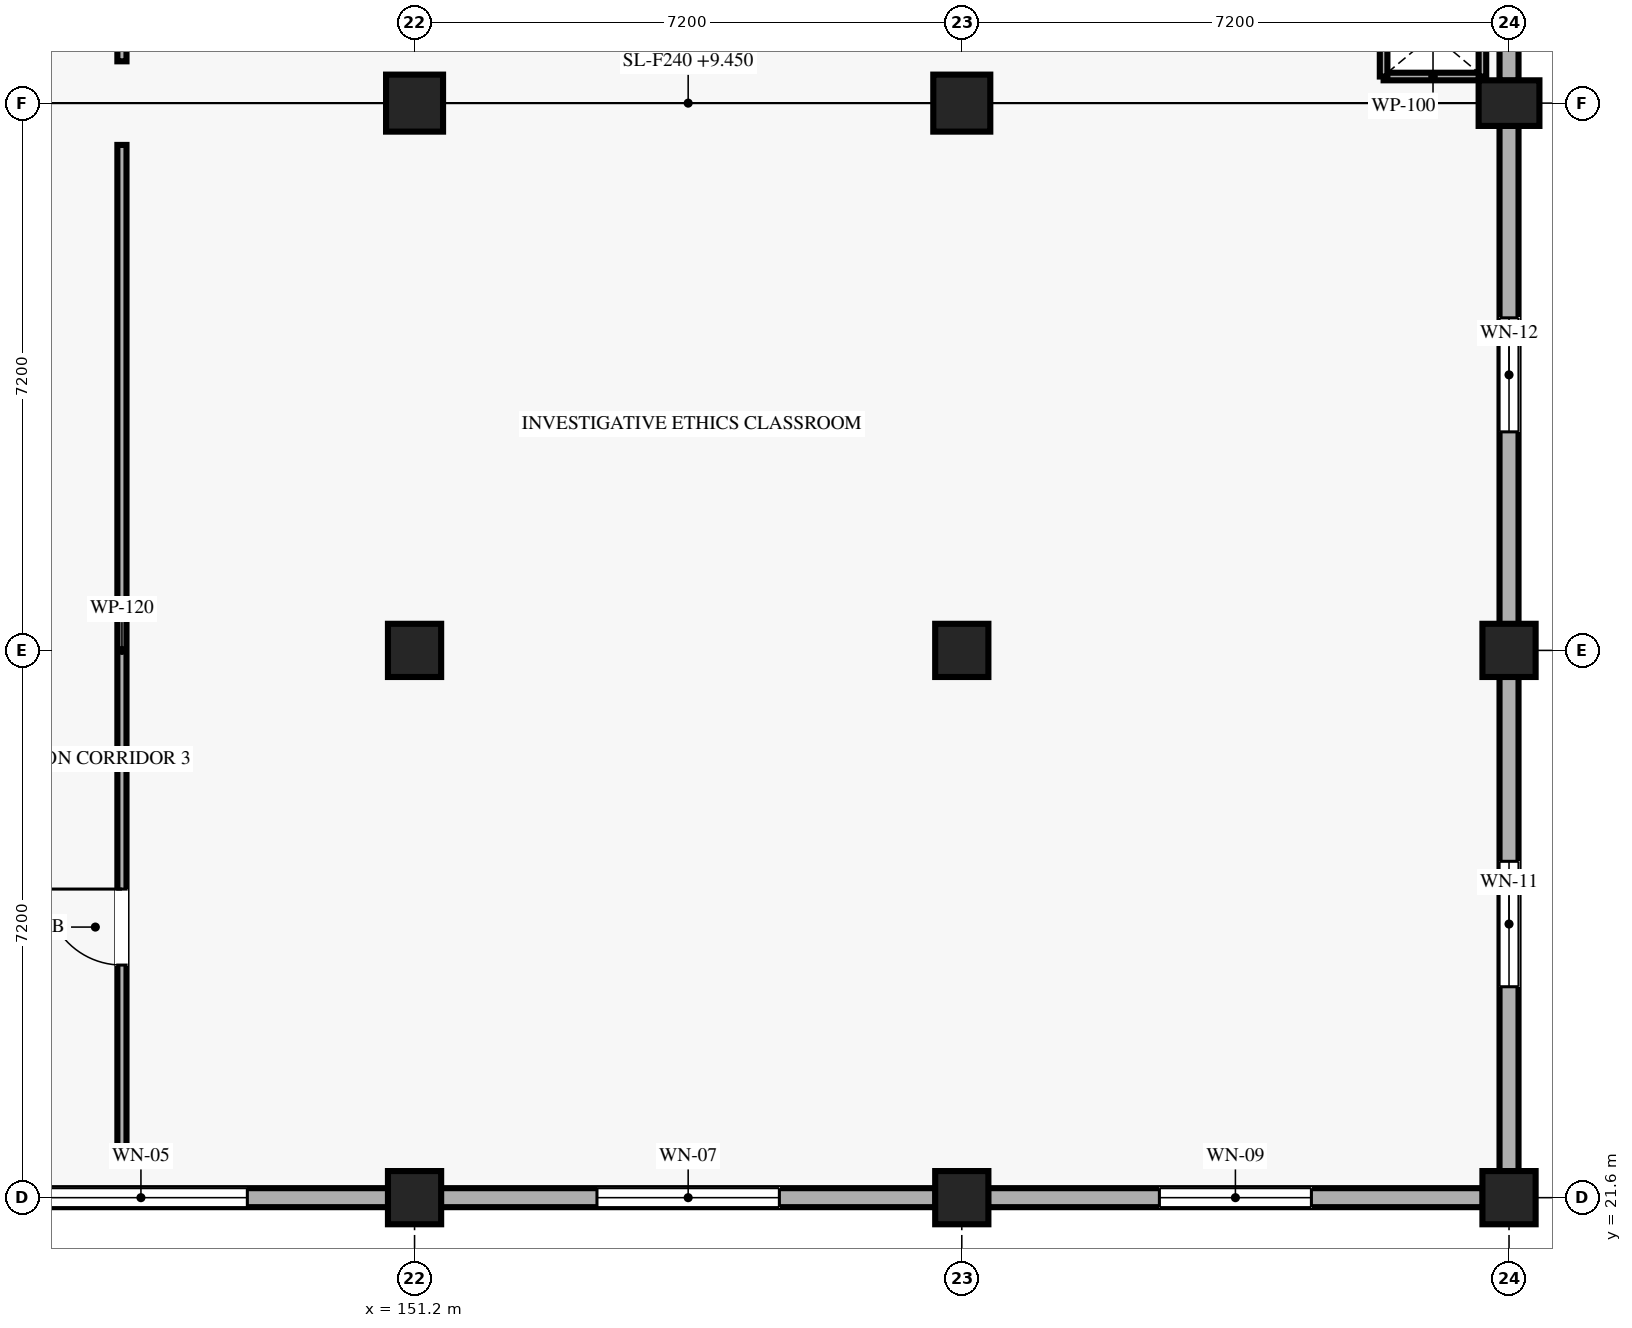
"""IFC4 building model, lengths in metres.
Left out: names, types, materials, properties, quantities, classifications, styles, units other than length and angle.
Written with IfcOpenShell. Run it as: python <this file> out.ifc"""

import sys

from ifc_helpers import new_model, si_unit, direction, frame, frame_2d, origin, origin_2d, place, context, subcontext, project, spatial, rectangle, extrude, element, fill, save


model = new_model("IFC4")
c1 = context("Model", 3, precision=1e-05, world=origin(), true_north=direction((0.0, 1.0)))
c2 = subcontext(c1, "Body", "Model", "MODEL_VIEW")
j1 = project(units=[si_unit("LENGTHUNIT", "METRE"), si_unit("PLANEANGLEUNIT", "RADIAN")], contexts=[c1])
p1 = place(None, origin())
s1 = spatial("IfcSite", under=j1, at=p1, CompositionType="ELEMENT")
p2 = place(p1, origin())
s2 = spatial("IfcBuilding", under=s1, at=p2, CompositionType="ELEMENT")
p3 = place(p2, frame((0.0, 0.0, 9.45)))
s3 = spatial("IfcBuildingStorey", under=s2, at=p3, CompositionType="ELEMENT", Elevation=9.45)
for number, where, z_axis, x_axis in (
    (1, (151.2, 21.6, 0.0), (0.0, 0.0, 1.0), (1.0, 0.0, 0.0)),
    (2, (151.2, 28.8, 0.0), (0.0, 0.0, 1.0), (1.0, 0.0, 0.0)),
):
    element("IfcColumn", number, at=place(p3, frame(where, z_axis=z_axis, x_axis=x_axis)), inside=s3, PredefinedType="COLUMN", context=c2, shape_type="SweptSolid", body=[
        extrude(rectangle(XDim=0.7, YDim=0.7, at=origin_2d()), origin(), (0.0, 0.0, 1.0), 4.05),
    ])
p4 = place(p3, frame((151.2, 36.0, 0.0), z_axis=(0.0, 0.0, 1.0), x_axis=(1.0, 0.0, 0.0)))
e3 = element("IfcColumn", 3, at=p4, inside=s3, PredefinedType="COLUMN", context=c2, shape_type="SweptSolid", body=[
    extrude(rectangle(XDim=0.75, YDim=0.75, at=origin_2d()), origin(), (0.0, 0.0, 1.0), 4.05),
])
for number, where, z_axis, x_axis in (
    (4, (158.4, 21.6, 0.0), (0.0, 0.0, 1.0), (1.0, 0.0, 0.0)),
    (5, (158.4, 28.8, 0.0), (0.0, 0.0, 1.0), (1.0, 0.0, 0.0)),
):
    element("IfcColumn", number, at=place(p3, frame(where, z_axis=z_axis, x_axis=x_axis)), inside=s3, PredefinedType="COLUMN", context=c2, shape_type="SweptSolid", body=[
        extrude(rectangle(XDim=0.7, YDim=0.7, at=origin_2d()), origin(), (0.0, 0.0, 1.0), 4.05),
    ])
p5 = place(p3, frame((158.4, 36.0, 0.0), z_axis=(0.0, 0.0, 1.0), x_axis=(1.0, 0.0, 0.0)))
e6 = element("IfcColumn", 6, at=p5, inside=s3, PredefinedType="COLUMN", context=c2, shape_type="SweptSolid", body=[
    extrude(rectangle(XDim=0.75, YDim=0.75, at=origin_2d()), origin(), (0.0, 0.0, 1.0), 4.05),
])
for number, where, z_axis, x_axis in (
    (7, (165.6, 21.6, 0.0), (0.0, 0.0, 1.0), (1.0, 0.0, 0.0)),
    (8, (165.6, 28.8, 0.0), (0.0, 0.0, 1.0), (1.0, 0.0, 0.0)),
):
    element("IfcColumn", number, at=place(p3, frame(where, z_axis=z_axis, x_axis=x_axis)), inside=s3, PredefinedType="COLUMN", context=c2, shape_type="SweptSolid", body=[
        extrude(rectangle(XDim=0.7, YDim=0.7, at=origin_2d()), origin(), (0.0, 0.0, 1.0), 4.05),
    ])
p6 = place(p3, frame((165.6, 36.0, 0.0), z_axis=(0.0, 0.0, 1.0), x_axis=(0.0, 1.0, 0.0)))
e9 = element("IfcColumn", 9, at=p6, inside=s3, PredefinedType="COLUMN", context=c2, shape_type="SweptSolid", body=[
    extrude(rectangle(XDim=0.6, YDim=0.8, at=origin_2d()), origin(), (0.0, 0.0, 1.0), 4.05),
])
p7 = place(p3, frame((144.345, 21.6, 0.0), z_axis=(0.0, 0.0, 1.0), x_axis=(1.0, 0.0, 0.0)))
e10 = element("IfcWall", 10, at=p7, inside=s3, PredefinedType="SOLIDWALL", context=c2, shape_type="SweptSolid", body=[
    extrude(rectangle(XDim=6.51, YDim=0.25, at=frame_2d((3.255, 0.0))), origin(), (0.0, 0.0, 1.0), 3.195),
])
p8 = place(p7, frame((1.855, 0.0, 0.85)))
e11 = element("IfcOpeningElement", 11, at=p8, cuts=e10, PredefinedType="OPENING", context=c2, shape_type="SweptSolid", body=[
    extrude(rectangle(XDim=2.8, YDim=1.85, at=frame_2d((1.4, 0.925))), frame((0.0, 0.135, 0.0), z_axis=(0.0, -1.0, 0.0), x_axis=(1.0, 0.0, 0.0)), (0.0, 0.0, 1.0), 0.27),
])
p9 = place(p3, frame((151.545, 21.6, 0.0), z_axis=(0.0, 0.0, 1.0), x_axis=(1.0, 0.0, 0.0)))
e12 = element("IfcWall", 12, at=p9, inside=s3, PredefinedType="SOLIDWALL", context=c2, shape_type="SweptSolid", body=[
    extrude(rectangle(XDim=6.51, YDim=0.25, at=frame_2d((3.255, 0.0))), origin(), (0.0, 0.0, 1.0), 3.195),
])
p10 = place(p9, frame((2.055, 0.0, 0.85)))
e13 = element("IfcOpeningElement", 13, at=p10, cuts=e12, PredefinedType="OPENING", context=c2, shape_type="SweptSolid", body=[
    extrude(rectangle(XDim=2.4, YDim=1.75, at=frame_2d((1.2, 0.875))), frame((0.0, 0.135, 0.0), z_axis=(0.0, -1.0, 0.0), x_axis=(1.0, 0.0, 0.0)), (0.0, 0.0, 1.0), 0.27),
])
p11 = place(p3, frame((158.745, 21.6, 0.0), z_axis=(0.0, 0.0, 1.0), x_axis=(1.0, 0.0, 0.0)))
e14 = element("IfcWall", 14, at=p11, inside=s3, PredefinedType="SOLIDWALL", context=c2, shape_type="SweptSolid", body=[
    extrude(rectangle(XDim=6.51, YDim=0.25, at=frame_2d((3.255, 0.0))), origin(), (0.0, 0.0, 1.0), 3.195),
])
p12 = place(p11, frame((2.255, 0.0, 0.85)))
e15 = element("IfcOpeningElement", 15, at=p12, cuts=e14, PredefinedType="OPENING", context=c2, shape_type="SweptSolid", body=[
    extrude(rectangle(XDim=2.0, YDim=1.65, at=frame_2d((1.0, 0.825))), frame((0.0, 0.135, 0.0), z_axis=(0.0, -1.0, 0.0), x_axis=(1.0, 0.0, 0.0)), (0.0, 0.0, 1.0), 0.27),
])
p13 = place(p3, frame((165.6, 21.945, 0.0), z_axis=(0.0, 0.0, 1.0), x_axis=(0.0, 1.0, 0.0)))
e16 = element("IfcWall", 16, at=p13, inside=s3, PredefinedType="SOLIDWALL", context=c2, shape_type="SweptSolid", body=[
    extrude(rectangle(XDim=6.51, YDim=0.25, at=frame_2d((3.255, 0.0))), origin(), (0.0, 0.0, 1.0), 3.195),
])
p14 = place(p13, frame((2.43, 0.0, 0.85)))
e17 = element("IfcOpeningElement", 17, at=p14, cuts=e16, PredefinedType="OPENING", context=c2, shape_type="SweptSolid", body=[
    extrude(rectangle(XDim=1.65, YDim=1.55, at=frame_2d((0.825, 0.775))), frame((0.0, 0.135, 0.0), z_axis=(0.0, -1.0, 0.0), x_axis=(1.0, 0.0, 0.0)), (0.0, 0.0, 1.0), 0.27),
])
p15 = place(p3, frame((165.6, 29.145, 0.0), z_axis=(0.0, 0.0, 1.0), x_axis=(0.0, 1.0, 0.0)))
e18 = element("IfcWall", 18, at=p15, inside=s3, PredefinedType="SOLIDWALL", context=c2, shape_type="SweptSolid", body=[
    extrude(rectangle(XDim=6.56, YDim=0.25, at=frame_2d((3.28, 0.0))), origin(), (0.0, 0.0, 1.0), 3.195),
])
p16 = place(p15, frame((2.53, 0.0, 0.85)))
e19 = element("IfcOpeningElement", 19, at=p16, cuts=e18, PredefinedType="OPENING", context=c2, shape_type="SweptSolid", body=[
    extrude(rectangle(XDim=1.5, YDim=2.05, at=frame_2d((0.75, 1.025))), frame((0.0, 0.135, 0.0), z_axis=(0.0, -1.0, 0.0), x_axis=(1.0, 0.0, 0.0)), (0.0, 0.0, 1.0), 0.27),
])
p17 = place(p3, frame((165.6, 36.295, 0.0), z_axis=(0.0, 0.0, 1.0), x_axis=(0.0, 1.0, 0.0)))
e20 = element("IfcWall", 20, at=p17, inside=s3, PredefinedType="SOLIDWALL", context=c2, shape_type="SweptSolid", body=[
    extrude(rectangle(XDim=3.11, YDim=0.25, at=frame_2d((1.555, 0.0))), origin(), (0.0, 0.0, 1.0), 3.195),
])
p18 = place(p17, frame((0.93, 0.0, 0.85)))
e21 = element("IfcOpeningElement", 21, at=p18, cuts=e20, PredefinedType="OPENING", context=c2, shape_type="SweptSolid", body=[
    extrude(rectangle(XDim=1.25, YDim=1.5, at=frame_2d((0.625, 0.75))), frame((0.0, 0.135, 0.0), z_axis=(0.0, -1.0, 0.0), x_axis=(1.0, 0.0, 0.0)), (0.0, 0.0, 1.0), 0.27),
])
p19 = place(p3, frame((163.95, 36.35, 0.0), z_axis=(0.0, 0.0, 1.0), x_axis=(1.0, 0.0, 0.0)))
e22 = element("IfcWall", 22, at=p19, inside=s3, PredefinedType="PARTITIONING", context=c2, shape_type="SweptSolid", body=[
    extrude(rectangle(XDim=1.3, YDim=0.1, at=frame_2d((0.65, 0.0))), origin(), (0.0, 0.0, 1.0), 3.2),
])
p20 = place(p3, frame((163.95, 36.35, 0.0), z_axis=(0.0, 0.0, 1.0), x_axis=(0.0, 1.0, 0.0)))
e23 = element("IfcWall", 23, at=p20, inside=s3, PredefinedType="PARTITIONING", context=c2, shape_type="SweptSolid", body=[
    extrude(rectangle(XDim=1.1, YDim=0.1, at=frame_2d((0.55, 0.0))), origin(), (0.0, 0.0, 1.0), 3.81),
])
p21 = place(p3, frame((165.25, 36.35, 0.0), z_axis=(0.0, 0.0, 1.0), x_axis=(0.0, 1.0, 0.0)))
e24 = element("IfcWall", 24, at=p21, inside=s3, PredefinedType="PARTITIONING", context=c2, shape_type="SweptSolid", body=[
    extrude(rectangle(XDim=1.1, YDim=0.1, at=frame_2d((0.55, 0.0))), origin(), (0.0, 0.0, 1.0), 3.2),
])
p22 = place(p3, frame((147.35, 36.55, 0.0), z_axis=(0.0, 0.0, 1.0), x_axis=(0.0, 1.0, 0.0)))
e25 = element("IfcWall", 25, at=p22, inside=s3, PredefinedType="PARTITIONING", context=c2, shape_type="SweptSolid", body=[
    extrude(rectangle(XDim=15.95, YDim=0.12, at=frame_2d((7.975, 0.0))), origin(), (0.0, 0.0, 1.0), 3.81),
])
p23 = place(p22, frame((2.25, 0.0, 0.0)))
e26 = element("IfcOpeningElement", 26, at=p23, cuts=e25, PredefinedType="OPENING", context=c2, shape_type="SweptSolid", body=[
    extrude(rectangle(XDim=1.7, YDim=2.2, at=frame_2d((0.85, 1.1))), frame((0.0, 0.07, 0.0), z_axis=(0.0, -1.0, 0.0), x_axis=(1.0, 0.0, 0.0)), (0.0, 0.0, 1.0), 0.14),
])
p24 = place(p3, frame((147.35, 22.15, 0.0), z_axis=(0.0, 0.0, 1.0), x_axis=(0.0, 1.0, 0.0)))
e27 = element("IfcWall", 27, at=p24, inside=s3, PredefinedType="PARTITIONING", context=c2, shape_type="SweptSolid", body=[
    extrude(rectangle(XDim=13.3, YDim=0.12, at=frame_2d((6.65, 0.0))), origin(), (0.0, 0.0, 1.0), 3.81),
])
p25 = place(p24, frame((2.51, 0.0, 0.0)))
e28 = element("IfcOpeningElement", 28, at=p25, cuts=e27, PredefinedType="OPENING", context=c2, shape_type="SweptSolid", body=[
    extrude(rectangle(XDim=1.0, YDim=2.1, at=frame_2d((0.5, 1.05))), frame((0.0, 0.07, 0.0), z_axis=(0.0, -1.0, 0.0), x_axis=(1.0, 0.0, 0.0)), (0.0, 0.0, 1.0), 0.14),
])
p26 = place(p8, origin())
e29 = element("IfcWindow", 29, at=p26, inside=s3, PartitioningType="SINGLE_PANEL", PredefinedType="WINDOW", context=c2, shape_type="SweptSolid", body=[
    extrude(rectangle(XDim=2.8, YDim=1.85, at=frame_2d((1.4, 0.925))), frame((0.0, 0.03, 0.0), z_axis=(0.0, -1.0, 0.0), x_axis=(1.0, 0.0, 0.0)), (0.0, 0.0, 1.0), 0.06),
])
fill(e11, e29)
p27 = place(p10, origin())
e30 = element("IfcWindow", 30, at=p27, inside=s3, PartitioningType="SINGLE_PANEL", PredefinedType="WINDOW", context=c2, shape_type="SweptSolid", body=[
    extrude(rectangle(XDim=2.4, YDim=1.75, at=frame_2d((1.2, 0.875))), frame((0.0, 0.03, 0.0), z_axis=(0.0, -1.0, 0.0), x_axis=(1.0, 0.0, 0.0)), (0.0, 0.0, 1.0), 0.06),
])
fill(e13, e30)
p28 = place(p12, origin())
e31 = element("IfcWindow", 31, at=p28, inside=s3, PartitioningType="SINGLE_PANEL", PredefinedType="WINDOW", context=c2, shape_type="SweptSolid", body=[
    extrude(rectangle(XDim=2.0, YDim=1.65, at=frame_2d((1.0, 0.825))), frame((0.0, 0.03, 0.0), z_axis=(0.0, -1.0, 0.0), x_axis=(1.0, 0.0, 0.0)), (0.0, 0.0, 1.0), 0.06),
])
fill(e15, e31)
p29 = place(p14, origin())
e32 = element("IfcWindow", 32, at=p29, inside=s3, PartitioningType="SINGLE_PANEL", PredefinedType="WINDOW", context=c2, shape_type="SweptSolid", body=[
    extrude(rectangle(XDim=1.65, YDim=1.55, at=frame_2d((0.825, 0.775))), frame((0.0, 0.03, 0.0), z_axis=(0.0, -1.0, 0.0), x_axis=(1.0, 0.0, 0.0)), (0.0, 0.0, 1.0), 0.06),
])
fill(e17, e32)
p30 = place(p16, origin())
e33 = element("IfcWindow", 33, at=p30, inside=s3, PartitioningType="SINGLE_PANEL", PredefinedType="WINDOW", context=c2, shape_type="SweptSolid", body=[
    extrude(rectangle(XDim=1.5, YDim=2.05, at=frame_2d((0.75, 1.025))), frame((0.0, 0.03, 0.0), z_axis=(0.0, -1.0, 0.0), x_axis=(1.0, 0.0, 0.0)), (0.0, 0.0, 1.0), 0.06),
])
fill(e19, e33)
p31 = place(p25, origin())
e34 = element("IfcDoor", 34, at=p31, inside=s3, OperationType="SINGLE_SWING_RIGHT", PredefinedType="DOOR", context=c2, shape_type="SweptSolid", body=[
    extrude(rectangle(XDim=1.0, YDim=2.1, at=frame_2d((0.5, 1.05))), frame((0.0, 0.025, 0.0), z_axis=(0.0, -1.0, 0.0), x_axis=(1.0, 0.0, 0.0)), (0.0, 0.0, 1.0), 0.05),
])
fill(e28, e34)
save(model, sys.argv[1])
